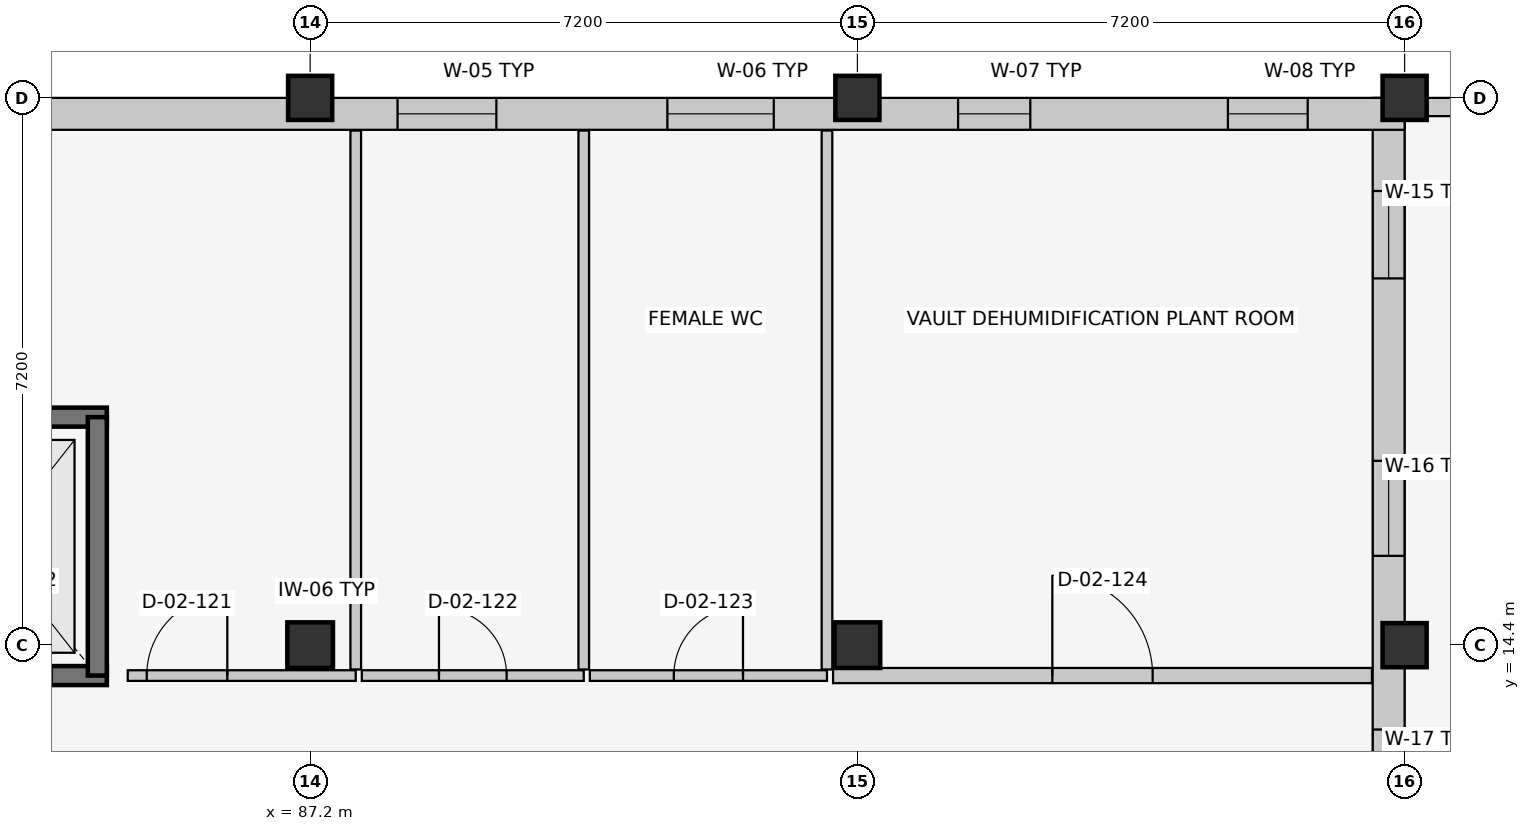
"""IFC4 building model, lengths in metres.
Left out: names, types, materials, properties, quantities, classifications, styles, units other than length and angle.
Written with IfcOpenShell. Run it as: python <this file> out.ifc"""

import sys

from ifc_helpers import new_model, si_unit, direction, frame, frame_2d, origin, origin_2d, place, context, subcontext, project, spatial, rectangle, extrude, element, fill, save


model = new_model("IFC4")
c1 = context("Model", 3, precision=1e-05, world=origin(), true_north=direction((0.0, 1.0)))
c2 = subcontext(c1, "Body", "Model", "MODEL_VIEW")
j1 = project(units=[si_unit("LENGTHUNIT", "METRE"), si_unit("PLANEANGLEUNIT", "RADIAN")], contexts=[c1])
p1 = place(None, origin())
s1 = spatial("IfcSite", under=j1, at=p1, CompositionType="ELEMENT")
p2 = place(p1, origin())
s2 = spatial("IfcBuilding", under=s1, at=p2, CompositionType="ELEMENT")
p3 = place(p2, frame((0.0, 0.0, 9.6)))
s3 = spatial("IfcBuildingStorey", under=s2, at=p3, CompositionType="ELEMENT", Elevation=9.6)
p4 = place(p3, frame((87.2, 14.4, 0.0), z_axis=(0.0, 0.0, 1.0), x_axis=(1.0, 0.0, 0.0)))
e1 = element("IfcColumn", 1, at=p4, inside=s3, PredefinedType="COLUMN", context=c2, shape_type="SweptSolid", body=[
    extrude(rectangle(XDim=0.6, YDim=0.6, at=origin_2d()), origin(), (0.0, 0.0, 1.0), 4.2),
])
p5 = place(p3, frame((87.2, 21.6, 0.0), z_axis=(0.0, 0.0, 1.0), x_axis=(1.0, 0.0, 0.0)))
e2 = element("IfcColumn", 2, at=p5, inside=s3, PredefinedType="COLUMN", context=c2, shape_type="SweptSolid", body=[
    extrude(rectangle(XDim=0.58, YDim=0.58, at=origin_2d()), origin(), (0.0, 0.0, 1.0), 4.2),
])
p6 = place(p3, frame((94.4, 14.4, 0.0), z_axis=(0.0, 0.0, 1.0), x_axis=(1.0, 0.0, 0.0)))
e3 = element("IfcColumn", 3, at=p6, inside=s3, PredefinedType="COLUMN", context=c2, shape_type="SweptSolid", body=[
    extrude(rectangle(XDim=0.6, YDim=0.6, at=origin_2d()), origin(), (0.0, 0.0, 1.0), 4.2),
])
for number, where, z_axis, x_axis in (
    (4, (94.4, 21.6, 0.0), (0.0, 0.0, 1.0), (1.0, 0.0, 0.0)),
    (5, (101.6, 14.4, 0.0), (0.0, 0.0, 1.0), (1.0, 0.0, 0.0)),
    (6, (101.6, 21.6, 0.0), (0.0, 0.0, 1.0), (1.0, 0.0, 0.0)),
):
    element("IfcColumn", number, at=place(p3, frame(where, z_axis=z_axis, x_axis=x_axis)), inside=s3, PredefinedType="COLUMN", context=c2, shape_type="SweptSolid", body=[
        extrude(rectangle(XDim=0.58, YDim=0.58, at=origin_2d()), origin(), (0.0, 0.0, 1.0), 4.2),
    ])
p7 = place(p3, frame((101.39, 21.6, 0.0), z_axis=(0.0, 0.0, 1.0), x_axis=(0.0, -1.0, 0.0)))
e7 = element("IfcWall", 7, at=p7, inside=s3, PredefinedType="SOLIDWALL", context=c2, shape_type="SweptSolid", body=[
    extrude(rectangle(XDim=21.6, YDim=0.42, at=frame_2d((10.8, 0.0))), origin(), (0.0, 0.0, 1.0), 3.355),
])
p8 = place(p7, frame((1.225, 0.0, 0.9)))
e8 = element("IfcOpeningElement", 8, at=p8, cuts=e7, PredefinedType="OPENING", context=c2, shape_type="SweptSolid", body=[
    extrude(rectangle(XDim=1.15, YDim=1.6, at=frame_2d((0.575, 0.8))), frame((0.0, 0.222, 0.0), z_axis=(0.0, -1.0, 0.0), x_axis=(1.0, 0.0, 0.0)), (0.0, 0.0, 1.0), 0.444),
])
p9 = place(p7, frame((4.775, 0.0, 0.9)))
e9 = element("IfcOpeningElement", 9, at=p9, cuts=e7, PredefinedType="OPENING", context=c2, shape_type="SweptSolid", body=[
    extrude(rectangle(XDim=1.25, YDim=1.6, at=frame_2d((0.625, 0.8))), frame((0.0, 0.222, 0.0), z_axis=(0.0, -1.0, 0.0), x_axis=(1.0, 0.0, 0.0)), (0.0, 0.0, 1.0), 0.444),
])
p10 = place(p7, frame((8.31, 0.0, 0.9)))
e10 = element("IfcOpeningElement", 10, at=p10, cuts=e7, PredefinedType="OPENING", context=c2, shape_type="SweptSolid", body=[
    extrude(rectangle(XDim=1.38, YDim=1.6, at=frame_2d((0.69, 0.8))), frame((0.0, 0.222, 0.0), z_axis=(0.0, -1.0, 0.0), x_axis=(1.0, 0.0, 0.0)), (0.0, 0.0, 1.0), 0.444),
])
p11 = place(p7, frame((11.85, 0.0, 0.9)))
e11 = element("IfcOpeningElement", 11, at=p11, cuts=e7, PredefinedType="OPENING", context=c2, shape_type="SweptSolid", body=[
    extrude(rectangle(XDim=1.5, YDim=1.6, at=frame_2d((0.75, 0.8))), frame((0.0, 0.222, 0.0), z_axis=(0.0, -1.0, 0.0), x_axis=(1.0, 0.0, 0.0)), (0.0, 0.0, 1.0), 0.444),
])
p12 = place(p7, frame((15.7, 0.0, 0.9)))
e12 = element("IfcOpeningElement", 12, at=p12, cuts=e7, PredefinedType="OPENING", context=c2, shape_type="SweptSolid", body=[
    extrude(rectangle(XDim=1.0, YDim=1.75, at=frame_2d((0.5, 0.875))), frame((0.0, 0.222, 0.0), z_axis=(0.0, -1.0, 0.0), x_axis=(1.0, 0.0, 0.0)), (0.0, 0.0, 1.0), 0.444),
])
p13 = place(p7, frame((19.24, 0.0, 0.9)))
e13 = element("IfcOpeningElement", 13, at=p13, cuts=e7, PredefinedType="OPENING", context=c2, shape_type="SweptSolid", body=[
    extrude(rectangle(XDim=1.12, YDim=1.75, at=frame_2d((0.56, 0.875))), frame((0.0, 0.222, 0.0), z_axis=(0.0, -1.0, 0.0), x_axis=(1.0, 0.0, 0.0)), (0.0, 0.0, 1.0), 0.444),
])
p14 = place(p3, frame((58.4, 21.39, 0.0), z_axis=(0.0, 0.0, 1.0), x_axis=(1.0, 0.0, 0.0)))
e14 = element("IfcWall", 14, at=p14, inside=s3, PredefinedType="SOLIDWALL", context=c2, shape_type="SweptSolid", body=[
    extrude(rectangle(XDim=43.2, YDim=0.42, at=frame_2d((21.6, 0.0))), origin(), (0.0, 0.0, 1.0), 3.255),
])
p15 = place(p14, frame((1.18, 0.0, 0.9)))
e15 = element("IfcOpeningElement", 15, at=p15, cuts=e14, PredefinedType="OPENING", context=c2, shape_type="SweptSolid", body=[
    extrude(rectangle(XDim=1.24, YDim=1.75, at=frame_2d((0.62, 0.875))), frame((0.0, 0.222, 0.0), z_axis=(0.0, -1.0, 0.0), x_axis=(1.0, 0.0, 0.0)), (0.0, 0.0, 1.0), 0.444),
])
p16 = place(p14, frame((4.73, 0.0, 0.9)))
e16 = element("IfcOpeningElement", 16, at=p16, cuts=e14, PredefinedType="OPENING", context=c2, shape_type="SweptSolid", body=[
    extrude(rectangle(XDim=1.34, YDim=1.75, at=frame_2d((0.67, 0.875))), frame((0.0, 0.222, 0.0), z_axis=(0.0, -1.0, 0.0), x_axis=(1.0, 0.0, 0.0)), (0.0, 0.0, 1.0), 0.444),
])
p17 = place(p14, frame((8.28, 0.0, 0.9)))
e17 = element("IfcOpeningElement", 17, at=p17, cuts=e14, PredefinedType="OPENING", context=c2, shape_type="SweptSolid", body=[
    extrude(rectangle(XDim=1.44, YDim=1.75, at=frame_2d((0.72, 0.875))), frame((0.0, 0.222, 0.0), z_axis=(0.0, -1.0, 0.0), x_axis=(1.0, 0.0, 0.0)), (0.0, 0.0, 1.0), 0.444),
])
p18 = place(p14, frame((15.75, 0.0, 0.9)))
e18 = element("IfcOpeningElement", 18, at=p18, cuts=e14, PredefinedType="OPENING", context=c2, shape_type="SweptSolid", body=[
    extrude(rectangle(XDim=0.9, YDim=1.35, at=frame_2d((0.45, 0.675))), frame((0.0, 0.222, 0.0), z_axis=(0.0, -1.0, 0.0), x_axis=(1.0, 0.0, 0.0)), (0.0, 0.0, 1.0), 0.444),
])
p19 = place(p14, frame((19.3, 0.0, 0.9)))
e19 = element("IfcOpeningElement", 19, at=p19, cuts=e14, PredefinedType="OPENING", context=c2, shape_type="SweptSolid", body=[
    extrude(rectangle(XDim=1.0, YDim=1.35, at=frame_2d((0.5, 0.675))), frame((0.0, 0.222, 0.0), z_axis=(0.0, -1.0, 0.0), x_axis=(1.0, 0.0, 0.0)), (0.0, 0.0, 1.0), 0.444),
])
p20 = place(p14, frame((22.85, 0.0, 0.9)))
e20 = element("IfcOpeningElement", 20, at=p20, cuts=e14, PredefinedType="OPENING", context=c2, shape_type="SweptSolid", body=[
    extrude(rectangle(XDim=1.1, YDim=1.35, at=frame_2d((0.55, 0.675))), frame((0.0, 0.222, 0.0), z_axis=(0.0, -1.0, 0.0), x_axis=(1.0, 0.0, 0.0)), (0.0, 0.0, 1.0), 0.444),
])
p21 = place(p14, frame((29.95, 0.0, 0.9)))
e21 = element("IfcOpeningElement", 21, at=p21, cuts=e14, PredefinedType="OPENING", context=c2, shape_type="SweptSolid", body=[
    extrude(rectangle(XDim=1.3, YDim=1.35, at=frame_2d((0.65, 0.675))), frame((0.0, 0.222, 0.0), z_axis=(0.0, -1.0, 0.0), x_axis=(1.0, 0.0, 0.0)), (0.0, 0.0, 1.0), 0.444),
])
p22 = place(p14, frame((33.5, 0.0, 0.9)))
e22 = element("IfcOpeningElement", 22, at=p22, cuts=e14, PredefinedType="OPENING", context=c2, shape_type="SweptSolid", body=[
    extrude(rectangle(XDim=1.4, YDim=1.35, at=frame_2d((0.7, 0.675))), frame((0.0, 0.222, 0.0), z_axis=(0.0, -1.0, 0.0), x_axis=(1.0, 0.0, 0.0)), (0.0, 0.0, 1.0), 0.444),
])
p23 = place(p14, frame((37.325, 0.0, 0.9)))
e23 = element("IfcOpeningElement", 23, at=p23, cuts=e14, PredefinedType="OPENING", context=c2, shape_type="SweptSolid", body=[
    extrude(rectangle(XDim=0.95, YDim=1.45, at=frame_2d((0.475, 0.725))), frame((0.0, 0.222, 0.0), z_axis=(0.0, -1.0, 0.0), x_axis=(1.0, 0.0, 0.0)), (0.0, 0.0, 1.0), 0.444),
])
p24 = place(p14, frame((40.875, 0.0, 0.9)))
e24 = element("IfcOpeningElement", 24, at=p24, cuts=e14, PredefinedType="OPENING", context=c2, shape_type="SweptSolid", body=[
    extrude(rectangle(XDim=1.05, YDim=1.45, at=frame_2d((0.525, 0.725))), frame((0.0, 0.222, 0.0), z_axis=(0.0, -1.0, 0.0), x_axis=(1.0, 0.0, 0.0)), (0.0, 0.0, 1.0), 0.444),
])
p25 = place(p3, frame((101.75, 21.48, 0.0), z_axis=(0.0, 0.0, 1.0), x_axis=(1.0, 0.0, 0.0)))
e25 = element("IfcWall", 25, at=p25, inside=s3, PredefinedType="PARAPET", context=c2, shape_type="SweptSolid", body=[
    extrude(rectangle(XDim=6.9, YDim=0.24, at=frame_2d((3.45, 0.0))), origin(), (0.0, 0.0, 1.0), 0.65),
])
p26 = place(p3, frame((81.475, 14.0, 0.0), z_axis=(0.0, 0.0, 1.0), x_axis=(1.0, 0.0, 0.0)))
e26 = element("IfcWall", 26, at=p26, inside=s3, PredefinedType="SHEAR", context=c2, shape_type="SweptSolid", body=[
    extrude(rectangle(XDim=3.05, YDim=0.25, at=frame_2d((1.525, 0.0))), origin(), (0.0, 0.0, 1.0), 3.96),
])
p27 = place(p26, frame((0.725, 0.0, 0.0)))
e27 = element("IfcOpeningElement", 27, at=p27, cuts=e26, PredefinedType="OPENING", context=c2, shape_type="SweptSolid", body=[
    extrude(rectangle(XDim=1.6, YDim=2.3, at=frame_2d((0.8, 1.15))), frame((0.0, 0.137, 0.0), z_axis=(0.0, -1.0, 0.0), x_axis=(1.0, 0.0, 0.0)), (0.0, 0.0, 1.0), 0.274),
])
p28 = place(p3, frame((84.525, 17.4, 0.0), z_axis=(0.0, 0.0, 1.0), x_axis=(-1.0, 0.0, 0.0)))
e28 = element("IfcWall", 28, at=p28, inside=s3, PredefinedType="SHEAR", context=c2, shape_type="SweptSolid", body=[
    extrude(rectangle(XDim=3.05, YDim=0.25, at=frame_2d((1.525, 0.0))), origin(), (0.0, 0.0, 1.0), 3.96),
])
p29 = place(p3, frame((84.4, 14.0, 0.0), z_axis=(0.0, 0.0, 1.0), x_axis=(0.0, 1.0, 0.0)))
e29 = element("IfcWall", 29, at=p29, inside=s3, PredefinedType="SHEAR", context=c2, shape_type="SweptSolid", body=[
    extrude(rectangle(XDim=3.4, YDim=0.25, at=frame_2d((1.7, 0.0))), origin(), (0.0, 0.0, 1.0), 3.96),
])
p30 = place(p3, frame((84.8, 14.0, 0.0), z_axis=(0.0, 0.0, 1.0), x_axis=(1.0, 0.0, 0.0)))
e30 = element("IfcWall", 30, at=p30, inside=s3, PredefinedType="PARTITIONING", context=c2, shape_type="SweptSolid", body=[
    extrude(rectangle(XDim=3.0, YDim=0.14, at=frame_2d((1.5, 0.0))), origin(), (0.0, 0.0, 1.0), 3.96),
])
p31 = place(p30, frame((0.25, 0.0, 0.0)))
e31 = element("IfcOpeningElement", 31, at=p31, cuts=e30, PredefinedType="OPENING", context=c2, shape_type="SweptSolid", body=[
    extrude(rectangle(XDim=1.06, YDim=2.1, at=frame_2d((0.53, 1.05))), frame((0.0, 0.082, 0.0), z_axis=(0.0, -1.0, 0.0), x_axis=(1.0, 0.0, 0.0)), (0.0, 0.0, 1.0), 0.164),
])
p32 = place(p3, frame((87.8, 14.08, 0.0), z_axis=(0.0, 0.0, 1.0), x_axis=(0.0, 1.0, 0.0)))
e32 = element("IfcWall", 32, at=p32, inside=s3, PredefinedType="PARTITIONING", context=c2, shape_type="SweptSolid", body=[
    extrude(rectangle(XDim=7.09, YDim=0.14, at=frame_2d((3.545, 0.0))), origin(), (0.0, 0.0, 1.0), 3.96),
])
p33 = place(p3, frame((87.88, 14.0, 0.0), z_axis=(0.0, 0.0, 1.0), x_axis=(1.0, 0.0, 0.0)))
e33 = element("IfcWall", 33, at=p33, inside=s3, PredefinedType="PARTITIONING", context=c2, shape_type="SweptSolid", body=[
    extrude(rectangle(XDim=2.92, YDim=0.14, at=frame_2d((1.46, 0.0))), origin(), (0.0, 0.0, 1.0), 3.96),
])
p34 = place(p33, frame((1.015, 0.0, 0.0)))
e34 = element("IfcOpeningElement", 34, at=p34, cuts=e33, PredefinedType="OPENING", context=c2, shape_type="SweptSolid", body=[
    extrude(rectangle(XDim=0.89, YDim=2.05, at=frame_2d((0.445, 1.025))), frame((0.0, 0.082, 0.0), z_axis=(0.0, -1.0, 0.0), x_axis=(1.0, 0.0, 0.0)), (0.0, 0.0, 1.0), 0.164),
])
p35 = place(p3, frame((90.8, 14.08, 0.0), z_axis=(0.0, 0.0, 1.0), x_axis=(0.0, 1.0, 0.0)))
e35 = element("IfcWall", 35, at=p35, inside=s3, PredefinedType="PARTITIONING", context=c2, shape_type="SweptSolid", body=[
    extrude(rectangle(XDim=7.09, YDim=0.14, at=frame_2d((3.545, 0.0))), origin(), (0.0, 0.0, 1.0), 3.745),
])
p36 = place(p3, frame((90.88, 14.0, 0.0), z_axis=(0.0, 0.0, 1.0), x_axis=(1.0, 0.0, 0.0)))
e36 = element("IfcWall", 36, at=p36, inside=s3, PredefinedType="PARTITIONING", context=c2, shape_type="SweptSolid", body=[
    extrude(rectangle(XDim=3.12, YDim=0.14, at=frame_2d((1.56, 0.0))), origin(), (0.0, 0.0, 1.0), 3.96),
])
p37 = place(p36, frame((1.105, 0.0, 0.0)))
e37 = element("IfcOpeningElement", 37, at=p37, cuts=e36, PredefinedType="OPENING", context=c2, shape_type="SweptSolid", body=[
    extrude(rectangle(XDim=0.91, YDim=2.06, at=frame_2d((0.455, 1.03))), frame((0.0, 0.082, 0.0), z_axis=(0.0, -1.0, 0.0), x_axis=(1.0, 0.0, 0.0)), (0.0, 0.0, 1.0), 0.164),
])
p38 = place(p3, frame((94.0, 14.08, 0.0), z_axis=(0.0, 0.0, 1.0), x_axis=(0.0, 1.0, 0.0)))
e38 = element("IfcWall", 38, at=p38, inside=s3, PredefinedType="PARTITIONING", context=c2, shape_type="SweptSolid", body=[
    extrude(rectangle(XDim=7.09, YDim=0.14, at=frame_2d((3.545, 0.0))), origin(), (0.0, 0.0, 1.0), 3.96),
])
p39 = place(p3, frame((94.08, 14.0, 0.0), z_axis=(0.0, 0.0, 1.0), x_axis=(1.0, 0.0, 0.0)))
e39 = element("IfcWall", 39, at=p39, inside=s3, PredefinedType="PARTITIONING", context=c2, shape_type="SweptSolid", body=[
    extrude(rectangle(XDim=7.09, YDim=0.2, at=frame_2d((3.545, 0.0))), origin(), (0.0, 0.0, 1.0), 3.96),
])
p40 = place(p39, frame((2.885, 0.0, 0.0)))
e40 = element("IfcOpeningElement", 40, at=p40, cuts=e39, PredefinedType="OPENING", context=c2, shape_type="SweptSolid", body=[
    extrude(rectangle(XDim=1.32, YDim=2.15, at=frame_2d((0.66, 1.075))), frame((0.0, 0.112, 0.0), z_axis=(0.0, -1.0, 0.0), x_axis=(1.0, 0.0, 0.0)), (0.0, 0.0, 1.0), 0.224),
])
p41 = place(p8, origin())
e41 = element("IfcWindow", 41, at=p41, inside=s3, PartitioningType="SINGLE_PANEL", PredefinedType="WINDOW", context=c2, shape_type="SweptSolid", body=[
    extrude(rectangle(XDim=1.15, YDim=1.6, at=frame_2d((0.575, 0.8))), frame((0.0, 0.03, 0.0), z_axis=(0.0, -1.0, 0.0), x_axis=(1.0, 0.0, 0.0)), (0.0, 0.0, 1.0), 0.06),
])
fill(e8, e41)
p42 = place(p9, origin())
e42 = element("IfcWindow", 42, at=p42, inside=s3, PartitioningType="SINGLE_PANEL", PredefinedType="WINDOW", context=c2, shape_type="SweptSolid", body=[
    extrude(rectangle(XDim=1.25, YDim=1.6, at=frame_2d((0.625, 0.8))), frame((0.0, 0.03, 0.0), z_axis=(0.0, -1.0, 0.0), x_axis=(1.0, 0.0, 0.0)), (0.0, 0.0, 1.0), 0.06),
])
fill(e9, e42)
p43 = place(p10, origin())
e43 = element("IfcWindow", 43, at=p43, inside=s3, PartitioningType="SINGLE_PANEL", PredefinedType="WINDOW", context=c2, shape_type="SweptSolid", body=[
    extrude(rectangle(XDim=1.38, YDim=1.6, at=frame_2d((0.69, 0.8))), frame((0.0, 0.03, 0.0), z_axis=(0.0, -1.0, 0.0), x_axis=(1.0, 0.0, 0.0)), (0.0, 0.0, 1.0), 0.06),
])
fill(e10, e43)
p44 = place(p21, origin())
e44 = element("IfcWindow", 44, at=p44, inside=s3, PartitioningType="SINGLE_PANEL", PredefinedType="WINDOW", context=c2, shape_type="SweptSolid", body=[
    extrude(rectangle(XDim=1.3, YDim=1.35, at=frame_2d((0.65, 0.675))), frame((0.0, 0.03, 0.0), z_axis=(0.0, -1.0, 0.0), x_axis=(1.0, 0.0, 0.0)), (0.0, 0.0, 1.0), 0.06),
])
fill(e21, e44)
p45 = place(p22, origin())
e45 = element("IfcWindow", 45, at=p45, inside=s3, PartitioningType="SINGLE_PANEL", PredefinedType="WINDOW", context=c2, shape_type="SweptSolid", body=[
    extrude(rectangle(XDim=1.4, YDim=1.35, at=frame_2d((0.7, 0.675))), frame((0.0, 0.03, 0.0), z_axis=(0.0, -1.0, 0.0), x_axis=(1.0, 0.0, 0.0)), (0.0, 0.0, 1.0), 0.06),
])
fill(e22, e45)
p46 = place(p23, origin())
e46 = element("IfcWindow", 46, at=p46, inside=s3, PartitioningType="SINGLE_PANEL", PredefinedType="WINDOW", context=c2, shape_type="SweptSolid", body=[
    extrude(rectangle(XDim=0.95, YDim=1.45, at=frame_2d((0.475, 0.725))), frame((0.0, 0.03, 0.0), z_axis=(0.0, -1.0, 0.0), x_axis=(1.0, 0.0, 0.0)), (0.0, 0.0, 1.0), 0.06),
])
fill(e23, e46)
p47 = place(p24, origin())
e47 = element("IfcWindow", 47, at=p47, inside=s3, PartitioningType="SINGLE_PANEL", PredefinedType="WINDOW", context=c2, shape_type="SweptSolid", body=[
    extrude(rectangle(XDim=1.05, YDim=1.45, at=frame_2d((0.525, 0.725))), frame((0.0, 0.03, 0.0), z_axis=(0.0, -1.0, 0.0), x_axis=(1.0, 0.0, 0.0)), (0.0, 0.0, 1.0), 0.06),
])
fill(e24, e47)
p48 = place(p27, origin())
e48 = element("IfcDoor", 48, at=p48, inside=s3, OperationType="DOUBLE_DOOR_SLIDING", PredefinedType="DOOR", context=c2, shape_type="SweptSolid", body=[
    extrude(rectangle(XDim=1.6, YDim=2.3, at=frame_2d((0.8, 1.15))), frame((0.0, 0.025, 0.0), z_axis=(0.0, -1.0, 0.0), x_axis=(1.0, 0.0, 0.0)), (0.0, 0.0, 1.0), 0.05),
])
fill(e27, e48)
p49 = place(p31, origin())
e49 = element("IfcDoor", 49, at=p49, inside=s3, OperationType="SINGLE_SWING_RIGHT", PredefinedType="DOOR", context=c2, shape_type="SweptSolid", body=[
    extrude(rectangle(XDim=1.06, YDim=2.1, at=frame_2d((0.53, 1.05))), frame((0.0, 0.025, 0.0), z_axis=(0.0, -1.0, 0.0), x_axis=(1.0, 0.0, 0.0)), (0.0, 0.0, 1.0), 0.05),
])
fill(e31, e49)
p50 = place(p34, origin())
e50 = element("IfcDoor", 50, at=p50, inside=s3, OperationType="SINGLE_SWING_LEFT", PredefinedType="DOOR", context=c2, shape_type="SweptSolid", body=[
    extrude(rectangle(XDim=0.89, YDim=2.05, at=frame_2d((0.445, 1.025))), frame((0.0, 0.025, 0.0), z_axis=(0.0, -1.0, 0.0), x_axis=(1.0, 0.0, 0.0)), (0.0, 0.0, 1.0), 0.05),
])
fill(e34, e50)
p51 = place(p37, origin())
e51 = element("IfcDoor", 51, at=p51, inside=s3, OperationType="SINGLE_SWING_RIGHT", PredefinedType="DOOR", context=c2, shape_type="SweptSolid", body=[
    extrude(rectangle(XDim=0.91, YDim=2.06, at=frame_2d((0.455, 1.03))), frame((0.0, 0.025, 0.0), z_axis=(0.0, -1.0, 0.0), x_axis=(1.0, 0.0, 0.0)), (0.0, 0.0, 1.0), 0.05),
])
fill(e37, e51)
p52 = place(p40, origin())
e52 = element("IfcDoor", 52, at=p52, inside=s3, OperationType="SINGLE_SWING_LEFT", PredefinedType="DOOR", context=c2, shape_type="SweptSolid", body=[
    extrude(rectangle(XDim=1.32, YDim=2.15, at=frame_2d((0.66, 1.075))), frame((0.0, 0.025, 0.0), z_axis=(0.0, -1.0, 0.0), x_axis=(1.0, 0.0, 0.0)), (0.0, 0.0, 1.0), 0.05),
])
fill(e40, e52)
save(model, sys.argv[1])
